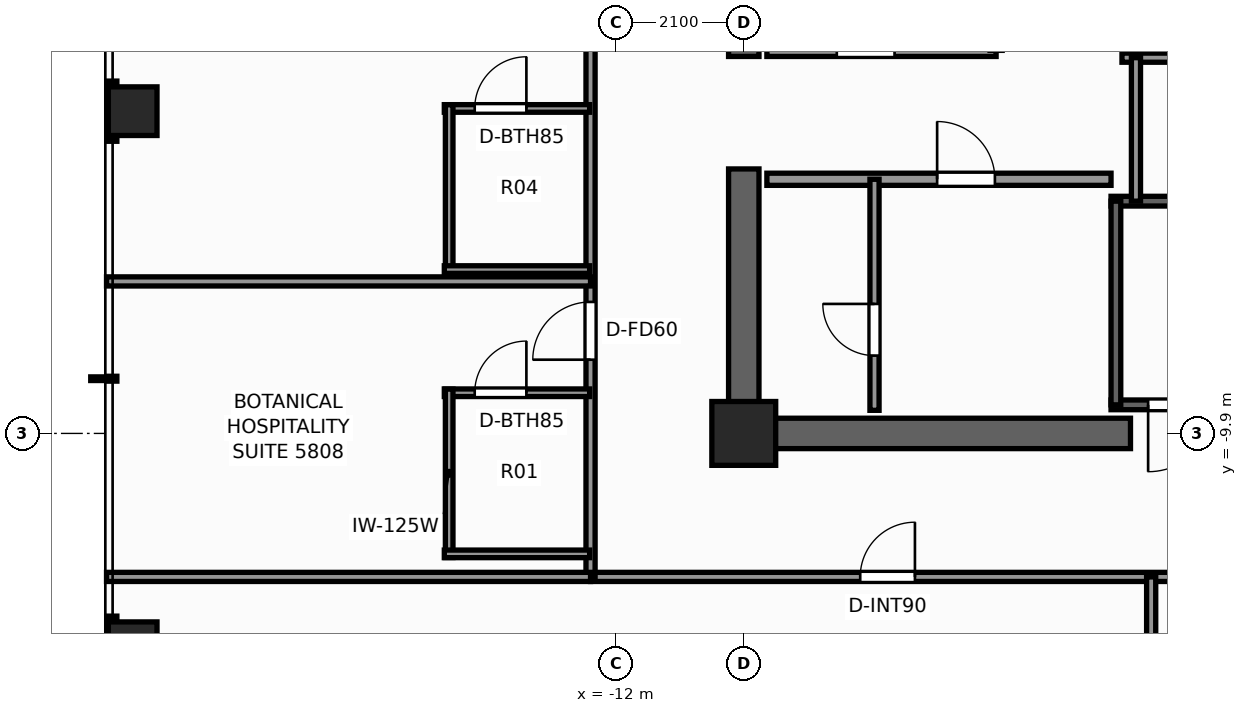
"""IFC4 building model, lengths in metres.
Left out: names, types, materials, properties, quantities, classifications, styles, units other than length and angle.
Written with IfcOpenShell. Run it as: python <this file> out.ifc"""

import sys

from ifc_helpers import new_model, si_unit, direction, frame, frame_2d, origin, origin_2d, place, context, subcontext, project, spatial, rectangle, extrude, element, fill, save


model = new_model("IFC4")
c1 = context("Model", 3, precision=1e-05, world=origin(), true_north=direction((0.0, 1.0)))
c2 = subcontext(c1, "Body", "Model", "MODEL_VIEW")
j1 = project(units=[si_unit("LENGTHUNIT", "METRE"), si_unit("PLANEANGLEUNIT", "RADIAN")], contexts=[c1])
p1 = place(None, origin())
s1 = spatial("IfcSite", under=j1, at=p1, CompositionType="ELEMENT")
p2 = place(p1, origin())
s2 = spatial("IfcBuilding", under=s1, at=p2, CompositionType="ELEMENT")
p3 = place(p2, frame((0.0, 0.0, 199.8)))
s3 = spatial("IfcBuildingStorey", under=s2, at=p3, CompositionType="ELEMENT", Elevation=199.8)
p4 = place(p3, frame((-3.54, -9.9, 0.0), z_axis=(0.0, 0.0, 1.0), x_axis=(-1.0, 0.0, 0.0)))
e1 = element("IfcWall", 1, at=p4, inside=s3, PredefinedType="SHEAR", context=c2, shape_type="SweptSolid", body=[
    extrude(rectangle(XDim=6.61, YDim=0.5, at=frame_2d((3.305, 0.0))), origin(), (0.0, 0.0, 1.0), 3.3),
])
p5 = place(p3, frame((-9.9, -9.65, 0.0), z_axis=(0.0, 0.0, 1.0), x_axis=(0.0, 1.0, 0.0)))
e2 = element("IfcWall", 2, at=p5, inside=s3, PredefinedType="SHEAR", context=c2, shape_type="SweptSolid", body=[
    extrude(rectangle(XDim=4.1, YDim=0.5, at=frame_2d((2.05, 0.0))), origin(), (0.0, 0.0, 1.0), 3.3),
])
p6 = place(p3, frame((-9.9, -3.7, 0.0), z_axis=(0.0, 0.0, 1.0), x_axis=(0.0, 1.0, 0.0)))
e3 = element("IfcWall", 3, at=p6, inside=s3, PredefinedType="SHEAR", context=c2, shape_type="SweptSolid", body=[
    extrude(rectangle(XDim=13.35, YDim=0.5, at=frame_2d((6.675, 0.0))), origin(), (0.0, 0.0, 1.0), 3.3),
])
p7 = place(p6, frame((0.35, 0.0, 0.0)))
e4 = element("IfcOpeningElement", 4, at=p7, cuts=e3, PredefinedType="OPENING", context=c2, shape_type="SweptSolid", body=[
    extrude(rectangle(XDim=1.1, YDim=2.2, at=frame_2d((0.55, 1.1))), frame((0.0, 0.26, 0.0), z_axis=(0.0, -1.0, 0.0), x_axis=(1.0, 0.0, 0.0)), (0.0, 0.0, 1.0), 0.52),
])
p8 = place(p3, frame((-9.9, -9.9, 0.0), z_axis=(0.0, 0.0, 1.0), x_axis=(1.0, 0.0, 0.0)))
e5 = element("IfcColumn", 5, at=p8, inside=s3, PredefinedType="COLUMN", context=c2, shape_type="SweptSolid", body=[
    extrude(rectangle(XDim=1.05, YDim=1.05, at=origin_2d()), origin(), (0.0, 0.0, 1.0), 3.3),
])
for number, where, z_axis, x_axis in (
    (6, (-19.95, -13.4, 0.0), (0.0, 0.0, 1.0), (1.0, 0.0, 0.0)),
    (7, (-19.95, -4.6, 0.0), (0.0, 0.0, 1.0), (1.0, 0.0, 0.0)),
):
    element("IfcColumn", number, at=place(p3, frame(where, z_axis=z_axis, x_axis=x_axis)), inside=s3, PredefinedType="COLUMN", context=c2, shape_type="SweptSolid", body=[
        extrude(rectangle(XDim=0.8, YDim=0.8, at=origin_2d()), origin(), (0.0, 0.0, 1.0), 3.3),
    ])
p9 = place(p3, frame((3.86, -9.43, 0.0), z_axis=(0.0, 0.0, 1.0), x_axis=(-1.0, 0.0, 0.0)))
e8 = element("IfcWall", 8, at=p9, inside=s3, PredefinedType="SHEAR", context=c2, shape_type="SweptSolid", body=[
    extrude(rectangle(XDim=7.72, YDim=0.16, at=frame_2d((3.86, 0.0))), origin(), (0.0, 0.0, 1.0), 3.3),
])
p10 = place(p9, frame((6.01, 0.0, 0.0)))
e9 = element("IfcOpeningElement", 9, at=p10, cuts=e8, PredefinedType="OPENING", context=c2, shape_type="SweptSolid", body=[
    extrude(rectangle(XDim=1.1, YDim=2.2, at=frame_2d((0.55, 1.1))), frame((0.0, 0.09, 0.0), z_axis=(0.0, -1.0, 0.0), x_axis=(1.0, 0.0, 0.0)), (0.0, 0.0, 1.0), 0.18),
])
p11 = place(p3, frame((-3.86, -6.08, 0.0), z_axis=(0.0, 0.0, 1.0), x_axis=(1.0, 0.0, 0.0)))
e10 = element("IfcWall", 10, at=p11, inside=s3, PredefinedType="SHEAR", context=c2, shape_type="SweptSolid", body=[
    extrude(rectangle(XDim=7.72, YDim=0.16, at=frame_2d((3.86, 0.0))), origin(), (0.0, 0.0, 1.0), 3.3),
])
p12 = place(p3, frame((-3.78, -9.43, 0.0), z_axis=(0.0, 0.0, 1.0), x_axis=(0.0, 1.0, 0.0)))
e11 = element("IfcWall", 11, at=p12, inside=s3, PredefinedType="SHEAR", context=c2, shape_type="SweptSolid", body=[
    extrude(rectangle(XDim=3.35, YDim=0.16, at=frame_2d((1.675, 0.0))), origin(), (0.0, 0.0, 1.0), 3.3),
])
p13 = place(p3, frame((-9.52, -3.6, 0.0), z_axis=(0.0, 0.0, 1.0), x_axis=(1.0, 0.0, 0.0)))
e12 = element("IfcWall", 12, at=p13, inside=s3, PredefinedType="SOLIDWALL", context=c2, shape_type="SweptSolid", body=[
    extrude(rectangle(XDim=3.77, YDim=0.2, at=frame_2d((1.885, 0.0))), origin(), (0.0, 0.0, 1.0), 3.08),
])
p14 = place(p13, frame((1.15, 0.0, 0.0)))
e13 = element("IfcOpeningElement", 13, at=p14, cuts=e12, PredefinedType="OPENING", context=c2, shape_type="SweptSolid", body=[
    extrude(rectangle(XDim=0.95, YDim=2.06, at=frame_2d((0.475, 1.03))), frame((0.0, 0.11, 0.0), z_axis=(0.0, -1.0, 0.0), x_axis=(1.0, 0.0, 0.0)), (0.0, 0.0, 1.0), 0.22),
])
p15 = place(p3, frame((-9.52, -5.72, 0.0), z_axis=(0.0, 0.0, 1.0), x_axis=(1.0, 0.0, 0.0)))
e14 = element("IfcWall", 14, at=p15, inside=s3, PredefinedType="SOLIDWALL", context=c2, shape_type="SweptSolid", body=[
    extrude(rectangle(XDim=5.66, YDim=0.2, at=frame_2d((2.83, 0.0))), origin(), (0.0, 0.0, 1.0), 3.08),
])
p16 = place(p15, frame((2.8, 0.0, 0.0)))
e15 = element("IfcOpeningElement", 15, at=p16, cuts=e14, PredefinedType="OPENING", context=c2, shape_type="SweptSolid", body=[
    extrude(rectangle(XDim=0.95, YDim=2.06, at=frame_2d((0.475, 1.03))), frame((0.0, 0.11, 0.0), z_axis=(0.0, -1.0, 0.0), x_axis=(1.0, 0.0, 0.0)), (0.0, 0.0, 1.0), 0.22),
])
p17 = place(p3, frame((-7.75, -9.52, 0.0), z_axis=(0.0, 0.0, 1.0), x_axis=(0.0, 1.0, 0.0)))
e16 = element("IfcWall", 16, at=p17, inside=s3, PredefinedType="PARTITIONING", context=c2, shape_type="SweptSolid", body=[
    extrude(rectangle(XDim=3.8, YDim=0.15, at=frame_2d((1.9, 0.0))), origin(), (0.0, 0.0, 1.0), 3.08),
])
p18 = place(p17, frame((0.9, 0.0, 0.0)))
e17 = element("IfcOpeningElement", 17, at=p18, cuts=e16, PredefinedType="OPENING", context=c2, shape_type="SweptSolid", body=[
    extrude(rectangle(XDim=0.85, YDim=2.03, at=frame_2d((0.425, 1.015))), frame((0.0, 0.085, 0.0), z_axis=(0.0, -1.0, 0.0), x_axis=(1.0, 0.0, 0.0)), (0.0, 0.0, 1.0), 0.17),
])
p19 = place(p3, frame((-3.68, -3.72, 0.0), z_axis=(0.0, 0.0, 1.0), x_axis=(1.0, 0.0, 0.0)))
e18 = element("IfcWall", 18, at=p19, inside=s3, PredefinedType="PARTITIONING", context=c2, shape_type="SweptSolid", body=[
    extrude(rectangle(XDim=7.36, YDim=0.15, at=frame_2d((3.68, 0.0))), origin(), (0.0, 0.0, 1.0), 3.08),
])
p20 = place(p3, frame((-3.45, -6.08, 0.0), z_axis=(0.0, 0.0, 1.0), x_axis=(0.0, 1.0, 0.0)))
e19 = element("IfcWall", 19, at=p20, inside=s3, PredefinedType="PARTITIONING", context=c2, shape_type="SweptSolid", body=[
    extrude(rectangle(XDim=2.36, YDim=0.15, at=frame_2d((1.18, 0.0))), origin(), (0.0, 0.0, 1.0), 3.08),
])
p21 = place(p3, frame((-12.42, -12.26, 0.0), z_axis=(0.0, 0.0, 1.0), x_axis=(1.0, 0.0, 0.0)))
e20 = element("IfcWall", 20, at=p21, inside=s3, PredefinedType="PARTITIONING", context=c2, shape_type="SweptSolid", body=[
    extrude(rectangle(XDim=24.84, YDim=0.15, at=frame_2d((12.42, 0.0))), origin(), (0.0, 0.0, 1.0), 2.369),
])
p22 = place(p21, frame((4.435, 0.0, 0.0)))
e21 = element("IfcOpeningElement", 21, at=p22, cuts=e20, PredefinedType="OPENING", context=c2, shape_type="SweptSolid", body=[
    extrude(rectangle(XDim=0.9, YDim=2.06, at=frame_2d((0.45, 1.03))), frame((0.0, 0.085, 0.0), z_axis=(0.0, -1.0, 0.0), x_axis=(1.0, 0.0, 0.0)), (0.0, 0.0, 1.0), 0.17),
])
p23 = place(p21, frame((19.505, 0.0, 0.0)))
e22 = element("IfcOpeningElement", 22, at=p23, cuts=e20, PredefinedType="OPENING", context=c2, shape_type="SweptSolid", body=[
    extrude(rectangle(XDim=0.9, YDim=2.06, at=frame_2d((0.45, 1.03))), frame((0.0, 0.085, 0.0), z_axis=(0.0, -1.0, 0.0), x_axis=(1.0, 0.0, 0.0)), (0.0, 0.0, 1.0), 0.17),
])
p24 = place(p3, frame((-12.42, -12.26, 0.0), z_axis=(0.0, 0.0, 1.0), x_axis=(0.0, 1.0, 0.0)))
e23 = element("IfcWall", 23, at=p24, inside=s3, PredefinedType="PARTITIONING", context=c2, shape_type="SweptSolid", body=[
    extrude(rectangle(XDim=24.84, YDim=0.15, at=frame_2d((12.42, 0.0))), origin(), (0.0, 0.0, 1.0), 2.369),
])
p25 = place(p24, frame((3.573, 0.0, 0.0)))
e24 = element("IfcOpeningElement", 24, at=p25, cuts=e23, PredefinedType="OPENING", context=c2, shape_type="SweptSolid", body=[
    extrude(rectangle(XDim=0.95, YDim=2.06, at=frame_2d((0.475, 1.03))), frame((0.0, 0.085, 0.0), z_axis=(0.0, -1.0, 0.0), x_axis=(1.0, 0.0, 0.0)), (0.0, 0.0, 1.0), 0.17),
])
p26 = place(p24, frame((9.755, 0.0, 0.0)))
e25 = element("IfcOpeningElement", 25, at=p26, cuts=e23, PredefinedType="OPENING", context=c2, shape_type="SweptSolid", body=[
    extrude(rectangle(XDim=0.95, YDim=2.06, at=frame_2d((0.475, 1.03))), frame((0.0, 0.085, 0.0), z_axis=(0.0, -1.0, 0.0), x_axis=(1.0, 0.0, 0.0)), (0.0, 0.0, 1.0), 0.17),
])
p27 = place(p24, frame((19.32, 0.0, 0.0)))
e26 = element("IfcOpeningElement", 26, at=p27, cuts=e23, PredefinedType="OPENING", context=c2, shape_type="SweptSolid", body=[
    extrude(rectangle(XDim=0.95, YDim=2.06, at=frame_2d((0.475, 1.03))), frame((0.0, 0.085, 0.0), z_axis=(0.0, -1.0, 0.0), x_axis=(1.0, 0.0, 0.0)), (0.0, 0.0, 1.0), 0.17),
])
p28 = place(p3, frame((-20.38, -12.26, 0.0), z_axis=(0.0, 0.0, 1.0), x_axis=(1.0, 0.0, 0.0)))
e27 = element("IfcWall", 27, at=p28, inside=s3, PredefinedType="PARTITIONING", context=c2, shape_type="SweptSolid", body=[
    extrude(rectangle(XDim=7.96, YDim=0.15, at=frame_2d((3.98, 0.0))), origin(), (0.0, 0.0, 1.0), 2.369),
])
p29 = place(p3, frame((-3.2, -20.38, 0.0), z_axis=(0.0, 0.0, 1.0), x_axis=(0.0, 1.0, 0.0)))
e28 = element("IfcWall", 28, at=p29, inside=s3, PredefinedType="PARTITIONING", context=c2, shape_type="SweptSolid", body=[
    extrude(rectangle(XDim=8.12, YDim=0.15, at=frame_2d((4.06, 0.0))), origin(), (0.0, 0.0, 1.0), 2.453),
])
p30 = place(p3, frame((-20.38, -7.4, 0.0), z_axis=(0.0, 0.0, 1.0), x_axis=(1.0, 0.0, 0.0)))
e29 = element("IfcWall", 29, at=p30, inside=s3, PredefinedType="PARTITIONING", context=c2, shape_type="SweptSolid", body=[
    extrude(rectangle(XDim=7.96, YDim=0.15, at=frame_2d((3.98, 0.0))), origin(), (0.0, 0.0, 1.0), 2.453),
])
p31 = place(p3, frame((-14.825, -9.231, 0.0), z_axis=(0.0, 0.0, 1.0), x_axis=(1.0, 0.0, 0.0)))
e30 = element("IfcWall", 30, at=p31, inside=s3, PredefinedType="PARTITIONING", context=c2, shape_type="SweptSolid", body=[
    extrude(rectangle(XDim=2.39, YDim=0.125, at=frame_2d((1.195, 0.0))), origin(), (0.0, 0.0, 1.0), 3.08),
])
p32 = place(p31, frame((0.5, 0.0, 0.0)))
e31 = element("IfcOpeningElement", 31, at=p32, cuts=e30, PredefinedType="OPENING", context=c2, shape_type="SweptSolid", body=[
    extrude(rectangle(XDim=0.85, YDim=2.03, at=frame_2d((0.425, 1.015))), frame((0.0, 0.073, 0.0), z_axis=(0.0, -1.0, 0.0), x_axis=(1.0, 0.0, 0.0)), (0.0, 0.0, 1.0), 0.145),
])
p33 = place(p3, frame((-14.745, -11.941, 0.0), z_axis=(0.0, 0.0, 1.0), x_axis=(0.0, 1.0, 0.0)))
e32 = element("IfcWall", 32, at=p33, inside=s3, PredefinedType="PARTITIONING", context=c2, shape_type="SweptSolid", body=[
    extrude(rectangle(XDim=2.77, YDim=0.125, at=frame_2d((1.385, 0.0))), origin(), (0.0, 0.0, 1.0), 2.369),
])
p34 = place(p3, frame((-14.825, -11.881, 0.0), z_axis=(0.0, 0.0, 1.0), x_axis=(1.0, 0.0, 0.0)))
e33 = element("IfcWall", 33, at=p34, inside=s3, PredefinedType="PARTITIONING", context=c2, shape_type="SweptSolid", body=[
    extrude(rectangle(XDim=2.39, YDim=0.125, at=frame_2d((1.195, 0.0))), origin(), (0.0, 0.0, 1.0), 3.08),
])
p35 = place(p3, frame((-14.825, -4.555, 0.0), z_axis=(0.0, 0.0, 1.0), x_axis=(1.0, 0.0, 0.0)))
e34 = element("IfcWall", 34, at=p35, inside=s3, PredefinedType="PARTITIONING", context=c2, shape_type="SweptSolid", body=[
    extrude(rectangle(XDim=2.39, YDim=0.125, at=frame_2d((1.195, 0.0))), origin(), (0.0, 0.0, 1.0), 2.369),
])
p36 = place(p35, frame((0.5, 0.0, 0.0)))
e35 = element("IfcOpeningElement", 35, at=p36, cuts=e34, PredefinedType="OPENING", context=c2, shape_type="SweptSolid", body=[
    extrude(rectangle(XDim=0.85, YDim=2.03, at=frame_2d((0.425, 1.015))), frame((0.0, 0.073, 0.0), z_axis=(0.0, -1.0, 0.0), x_axis=(1.0, 0.0, 0.0)), (0.0, 0.0, 1.0), 0.145),
])
p37 = place(p3, frame((-14.745, -7.265, 0.0), z_axis=(0.0, 0.0, 1.0), x_axis=(0.0, 1.0, 0.0)))
e36 = element("IfcWall", 36, at=p37, inside=s3, PredefinedType="PARTITIONING", context=c2, shape_type="SweptSolid", body=[
    extrude(rectangle(XDim=2.77, YDim=0.125, at=frame_2d((1.385, 0.0))), origin(), (0.0, 0.0, 1.0), 2.369),
])
p38 = place(p3, frame((-14.825, -7.205, 0.0), z_axis=(0.0, 0.0, 1.0), x_axis=(1.0, 0.0, 0.0)))
e37 = element("IfcWall", 37, at=p38, inside=s3, PredefinedType="PARTITIONING", context=c2, shape_type="SweptSolid", body=[
    extrude(rectangle(XDim=2.39, YDim=0.125, at=frame_2d((1.195, 0.0))), origin(), (0.0, 0.0, 1.0), 3.08),
])
p39 = place(p10, origin())
e38 = element("IfcDoor", 38, at=p39, inside=s3, OperationType="SINGLE_SWING_RIGHT", PredefinedType="DOOR", context=c2, shape_type="SweptSolid", body=[
    extrude(rectangle(XDim=1.1, YDim=2.2, at=frame_2d((0.55, 1.1))), frame((0.0, 0.025, 0.0), z_axis=(0.0, -1.0, 0.0), x_axis=(1.0, 0.0, 0.0)), (0.0, 0.0, 1.0), 0.05),
])
fill(e9, e38)
p40 = place(p16, origin())
e39 = element("IfcDoor", 39, at=p40, inside=s3, OperationType="SINGLE_SWING_LEFT", PredefinedType="DOOR", context=c2, shape_type="SweptSolid", body=[
    extrude(rectangle(XDim=0.95, YDim=2.06, at=frame_2d((0.475, 1.03))), frame((0.0, 0.025, 0.0), z_axis=(0.0, -1.0, 0.0), x_axis=(1.0, 0.0, 0.0)), (0.0, 0.0, 1.0), 0.05),
])
fill(e15, e39)
p41 = place(p18, origin())
e40 = element("IfcDoor", 40, at=p41, inside=s3, OperationType="SINGLE_SWING_RIGHT", PredefinedType="DOOR", context=c2, shape_type="SweptSolid", body=[
    extrude(rectangle(XDim=0.85, YDim=2.03, at=frame_2d((0.425, 1.015))), frame((0.0, 0.025, 0.0), z_axis=(0.0, -1.0, 0.0), x_axis=(1.0, 0.0, 0.0)), (0.0, 0.0, 1.0), 0.05),
])
fill(e17, e40)
p42 = place(p14, origin())
e41 = element("IfcDoor", 41, at=p42, inside=s3, OperationType="SINGLE_SWING_LEFT", PredefinedType="DOOR", context=c2, shape_type="SweptSolid", body=[
    extrude(rectangle(XDim=0.95, YDim=2.06, at=frame_2d((0.475, 1.03))), frame((0.0, 0.025, 0.0), z_axis=(0.0, -1.0, 0.0), x_axis=(1.0, 0.0, 0.0)), (0.0, 0.0, 1.0), 0.05),
])
fill(e13, e41)
p43 = place(p22, origin())
e42 = element("IfcDoor", 42, at=p43, inside=s3, OperationType="SINGLE_SWING_RIGHT", PredefinedType="DOOR", context=c2, shape_type="SweptSolid", body=[
    extrude(rectangle(XDim=0.9, YDim=2.06, at=frame_2d((0.45, 1.03))), frame((0.0, 0.025, 0.0), z_axis=(0.0, -1.0, 0.0), x_axis=(1.0, 0.0, 0.0)), (0.0, 0.0, 1.0), 0.05),
])
fill(e21, e42)
p44 = place(p32, origin())
e43 = element("IfcDoor", 43, at=p44, inside=s3, OperationType="SINGLE_SWING_RIGHT", PredefinedType="DOOR", context=c2, shape_type="SweptSolid", body=[
    extrude(rectangle(XDim=0.85, YDim=2.03, at=frame_2d((0.425, 1.015))), frame((0.0, 0.025, 0.0), z_axis=(0.0, -1.0, 0.0), x_axis=(1.0, 0.0, 0.0)), (0.0, 0.0, 1.0), 0.05),
])
fill(e31, e43)
p45 = place(p25, origin())
e44 = element("IfcDoor", 44, at=p45, inside=s3, OperationType="SINGLE_SWING_LEFT", PredefinedType="DOOR", context=c2, shape_type="SweptSolid", body=[
    extrude(rectangle(XDim=0.95, YDim=2.06, at=frame_2d((0.475, 1.03))), frame((0.0, 0.025, 0.0), z_axis=(0.0, -1.0, 0.0), x_axis=(1.0, 0.0, 0.0)), (0.0, 0.0, 1.0), 0.05),
])
fill(e24, e44)
p46 = place(p36, origin())
e45 = element("IfcDoor", 45, at=p46, inside=s3, OperationType="SINGLE_SWING_RIGHT", PredefinedType="DOOR", context=c2, shape_type="SweptSolid", body=[
    extrude(rectangle(XDim=0.85, YDim=2.03, at=frame_2d((0.425, 1.015))), frame((0.0, 0.025, 0.0), z_axis=(0.0, -1.0, 0.0), x_axis=(1.0, 0.0, 0.0)), (0.0, 0.0, 1.0), 0.05),
])
fill(e35, e45)
save(model, sys.argv[1])
